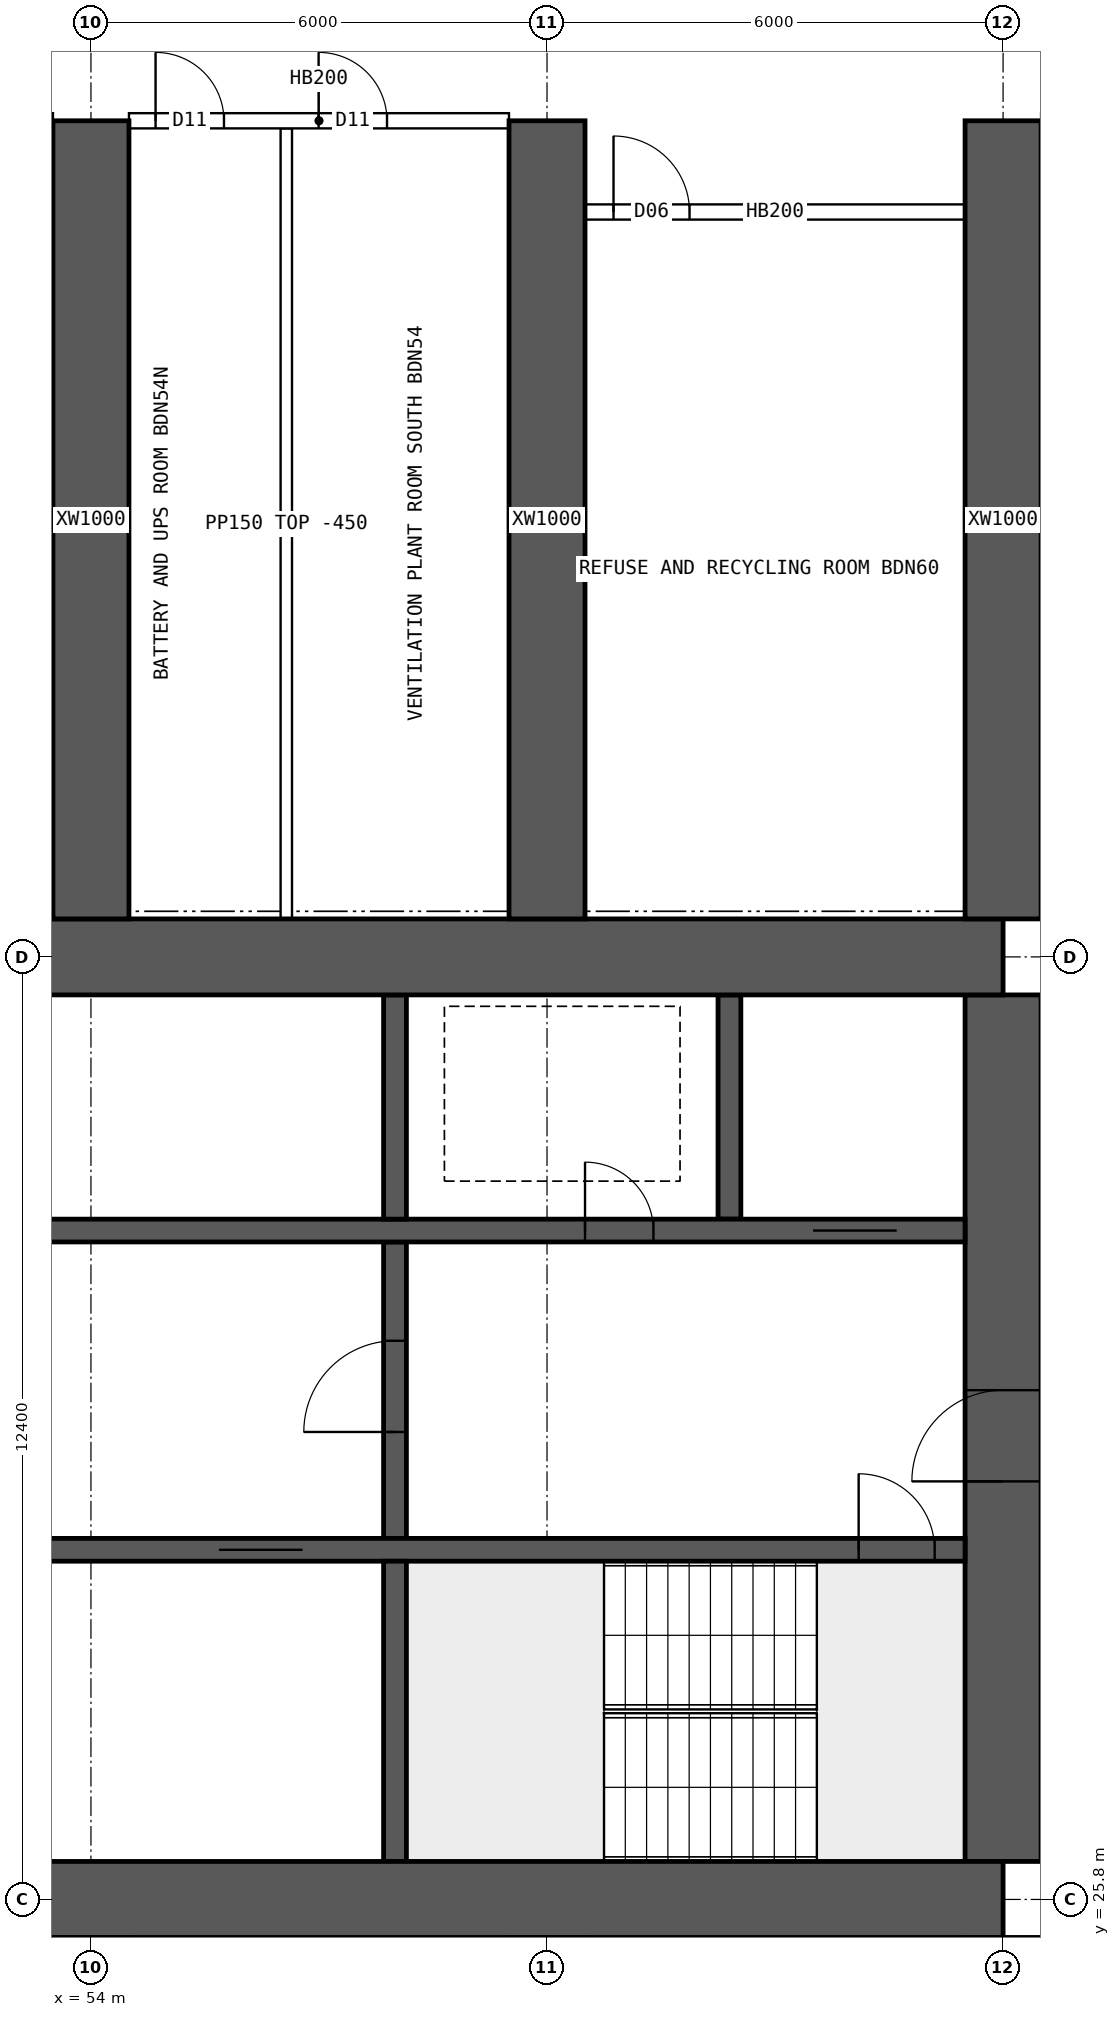
"""IFC4 building model, lengths in metres.
Left out: names, types, materials, properties, quantities, classifications, styles, units other than length and angle.
Written with IfcOpenShell. Run it as: python <this file> out.ifc"""

import sys

from ifc_helpers import new_model, si_unit, direction, frame, frame_2d, origin, place, context, subcontext, project, spatial, rectangle, extrude, element, fill, save


model = new_model("IFC4")
c1 = context("Model", 3, precision=1e-05, world=origin(), true_north=direction((0.0, 1.0)))
c2 = subcontext(c1, "Body", "Model", "MODEL_VIEW")
j1 = project(units=[si_unit("LENGTHUNIT", "METRE"), si_unit("PLANEANGLEUNIT", "RADIAN")], contexts=[c1])
p1 = place(None, origin())
s1 = spatial("IfcSite", under=j1, at=p1, CompositionType="ELEMENT")
p2 = place(p1, origin())
s2 = spatial("IfcBuilding", under=s1, at=p2, CompositionType="ELEMENT")
p3 = place(p2, frame((0.0, 0.0, 35.2)))
s3 = spatial("IfcBuildingStorey", under=s2, at=p3, CompositionType="ELEMENT", Elevation=35.2)
for number, where, z_axis, x_axis in (
    (1, (18.0, 25.8, 0.0), (0.0, 0.0, 1.0), (1.0, 0.0, 0.0)),
    (2, (18.0, 38.2, 0.0), (0.0, 0.0, 1.0), (1.0, 0.0, 0.0)),
):
    element("IfcWall", number, at=place(p3, frame(where, z_axis=z_axis, x_axis=x_axis)), inside=s3, PredefinedType="SHEAR", context=c2, shape_type="SweptSolid", body=[
        extrude(rectangle(XDim=48.0, YDim=1.0, at=frame_2d((24.0, 0.0))), origin(), (0.0, 0.0, 1.0), 3.75),
    ])
p4 = place(p3, frame((66.0, 26.3, 0.0), z_axis=(0.0, 0.0, 1.0), x_axis=(0.0, 1.0, 0.0)))
e3 = element("IfcWall", 3, at=p4, inside=s3, PredefinedType="SHEAR", context=c2, shape_type="SweptSolid", body=[
    extrude(rectangle(XDim=11.4, YDim=1.0, at=frame_2d((5.7, 0.0))), origin(), (0.0, 0.0, 1.0), 3.75),
])
p5 = place(p4, frame((5.0, 0.0, 0.0)))
e4 = element("IfcOpeningElement", 4, at=p5, cuts=e3, PredefinedType="OPENING", context=c2, shape_type="SweptSolid", body=[
    extrude(rectangle(XDim=1.2, YDim=2.1, at=frame_2d((0.6, 1.05))), frame((0.0, 0.51, 0.0), z_axis=(0.0, -1.0, 0.0), x_axis=(1.0, 0.0, 0.0)), (0.0, 0.0, 1.0), 1.02),
])
p6 = place(p3, frame((18.5, 30.4, 0.0), z_axis=(0.0, 0.0, 1.0), x_axis=(1.0, 0.0, 0.0)))
e5 = element("IfcWall", 5, at=p6, inside=s3, PredefinedType="SHEAR", context=c2, shape_type="SweptSolid", body=[
    extrude(rectangle(XDim=47.0, YDim=0.3, at=frame_2d((23.5, 0.0))), origin(), (0.0, 0.0, 1.0), 3.75),
])
p7 = place(p6, frame((0.4, 0.0, 0.0)))
e6 = element("IfcOpeningElement", 6, at=p7, cuts=e5, PredefinedType="OPENING", context=c2, shape_type="SweptSolid", body=[
    extrude(rectangle(XDim=1.0, YDim=2.1, at=frame_2d((0.5, 1.05))), frame((0.0, 0.16, 0.0), z_axis=(0.0, -1.0, 0.0), x_axis=(1.0, 0.0, 0.0)), (0.0, 0.0, 1.0), 0.32),
])
p8 = place(p6, frame((45.6, 0.0, 0.0)))
e7 = element("IfcOpeningElement", 7, at=p8, cuts=e5, PredefinedType="OPENING", context=c2, shape_type="SweptSolid", body=[
    extrude(rectangle(XDim=1.0, YDim=2.1, at=frame_2d((0.5, 1.05))), frame((0.0, 0.16, 0.0), z_axis=(0.0, -1.0, 0.0), x_axis=(1.0, 0.0, 0.0)), (0.0, 0.0, 1.0), 0.32),
])
p9 = place(p6, frame((8.25, 0.0, 0.0)))
e8 = element("IfcOpeningElement", 8, at=p9, cuts=e5, PredefinedType="OPENING", context=c2, shape_type="SweptSolid", body=[
    extrude(rectangle(XDim=1.1, YDim=2.1, at=frame_2d((0.55, 1.05))), frame((0.0, 0.16, 0.0), z_axis=(0.0, -1.0, 0.0), x_axis=(1.0, 0.0, 0.0)), (0.0, 0.0, 1.0), 0.32),
])
p10 = place(p6, frame((10.85, 0.0, 0.0)))
e9 = element("IfcOpeningElement", 9, at=p10, cuts=e5, PredefinedType="OPENING", context=c2, shape_type="SweptSolid", body=[
    extrude(rectangle(XDim=1.1, YDim=2.1, at=frame_2d((0.55, 1.05))), frame((0.0, 0.16, 0.0), z_axis=(0.0, -1.0, 0.0), x_axis=(1.0, 0.0, 0.0)), (0.0, 0.0, 1.0), 0.32),
])
p11 = place(p6, frame((13.45, 0.0, 0.0)))
e10 = element("IfcOpeningElement", 10, at=p11, cuts=e5, PredefinedType="OPENING", context=c2, shape_type="SweptSolid", body=[
    extrude(rectangle(XDim=1.1, YDim=2.1, at=frame_2d((0.55, 1.05))), frame((0.0, 0.16, 0.0), z_axis=(0.0, -1.0, 0.0), x_axis=(1.0, 0.0, 0.0)), (0.0, 0.0, 1.0), 0.32),
])
p12 = place(p6, frame((16.05, 0.0, 0.0)))
e11 = element("IfcOpeningElement", 11, at=p12, cuts=e5, PredefinedType="OPENING", context=c2, shape_type="SweptSolid", body=[
    extrude(rectangle(XDim=1.1, YDim=2.1, at=frame_2d((0.55, 1.05))), frame((0.0, 0.16, 0.0), z_axis=(0.0, -1.0, 0.0), x_axis=(1.0, 0.0, 0.0)), (0.0, 0.0, 1.0), 0.32),
])
p13 = place(p6, frame((30.117, 0.0, 0.0)))
e12 = element("IfcOpeningElement", 12, at=p13, cuts=e5, PredefinedType="OPENING", context=c2, shape_type="SweptSolid", body=[
    extrude(rectangle(XDim=1.1, YDim=2.1, at=frame_2d((0.55, 1.05))), frame((0.0, 0.16, 0.0), z_axis=(0.0, -1.0, 0.0), x_axis=(1.0, 0.0, 0.0)), (0.0, 0.0, 1.0), 0.32),
])
p14 = place(p6, frame((33.65, 0.0, 0.0)))
e13 = element("IfcOpeningElement", 13, at=p14, cuts=e5, PredefinedType="OPENING", context=c2, shape_type="SweptSolid", body=[
    extrude(rectangle(XDim=1.1, YDim=2.1, at=frame_2d((0.55, 1.05))), frame((0.0, 0.16, 0.0), z_axis=(0.0, -1.0, 0.0), x_axis=(1.0, 0.0, 0.0)), (0.0, 0.0, 1.0), 0.32),
])
p15 = place(p6, frame((37.183, 0.0, 0.0)))
e14 = element("IfcOpeningElement", 14, at=p15, cuts=e5, PredefinedType="OPENING", context=c2, shape_type="SweptSolid", body=[
    extrude(rectangle(XDim=1.1, YDim=2.1, at=frame_2d((0.55, 1.05))), frame((0.0, 0.16, 0.0), z_axis=(0.0, -1.0, 0.0), x_axis=(1.0, 0.0, 0.0)), (0.0, 0.0, 1.0), 0.32),
])
p16 = place(p3, frame((18.5, 34.6, 0.0), z_axis=(0.0, 0.0, 1.0), x_axis=(1.0, 0.0, 0.0)))
e15 = element("IfcWall", 15, at=p16, inside=s3, PredefinedType="SHEAR", context=c2, shape_type="SweptSolid", body=[
    extrude(rectangle(XDim=47.0, YDim=0.3, at=frame_2d((23.5, 0.0))), origin(), (0.0, 0.0, 1.0), 3.75),
])
p17 = place(p16, frame((0.9, 0.0, 0.0)))
e16 = element("IfcOpeningElement", 16, at=p17, cuts=e15, PredefinedType="OPENING", context=c2, shape_type="SweptSolid", body=[
    extrude(rectangle(XDim=1.1, YDim=2.1, at=frame_2d((0.55, 1.05))), frame((0.0, 0.16, 0.0), z_axis=(0.0, -1.0, 0.0), x_axis=(1.0, 0.0, 0.0)), (0.0, 0.0, 1.0), 0.32),
])
p18 = place(p16, frame((45.0, 0.0, 0.0)))
e17 = element("IfcOpeningElement", 17, at=p18, cuts=e15, PredefinedType="OPENING", context=c2, shape_type="SweptSolid", body=[
    extrude(rectangle(XDim=1.1, YDim=2.1, at=frame_2d((0.55, 1.05))), frame((0.0, 0.16, 0.0), z_axis=(0.0, -1.0, 0.0), x_axis=(1.0, 0.0, 0.0)), (0.0, 0.0, 1.0), 0.32),
])
p19 = place(p16, frame((4.1, 0.0, 0.0)))
e18 = element("IfcOpeningElement", 18, at=p19, cuts=e15, PredefinedType="OPENING", context=c2, shape_type="SweptSolid", body=[
    extrude(rectangle(XDim=0.9, YDim=2.1, at=frame_2d((0.45, 1.05))), frame((0.0, 0.16, 0.0), z_axis=(0.0, -1.0, 0.0), x_axis=(1.0, 0.0, 0.0)), (0.0, 0.0, 1.0), 0.32),
])
p20 = place(p16, frame((42.0, 0.0, 0.0)))
e19 = element("IfcOpeningElement", 19, at=p20, cuts=e15, PredefinedType="OPENING", context=c2, shape_type="SweptSolid", body=[
    extrude(rectangle(XDim=0.9, YDim=2.1, at=frame_2d((0.45, 1.05))), frame((0.0, 0.16, 0.0), z_axis=(0.0, -1.0, 0.0), x_axis=(1.0, 0.0, 0.0)), (0.0, 0.0, 1.0), 0.32),
])
p21 = place(p16, frame((8.875, 0.0, 0.0)))
e20 = element("IfcOpeningElement", 20, at=p21, cuts=e15, PredefinedType="OPENING", context=c2, shape_type="SweptSolid", body=[
    extrude(rectangle(XDim=0.9, YDim=2.1, at=frame_2d((0.45, 1.05))), frame((0.0, 0.16, 0.0), z_axis=(0.0, -1.0, 0.0), x_axis=(1.0, 0.0, 0.0)), (0.0, 0.0, 1.0), 0.32),
])
p22 = place(p16, frame((12.849, 0.0, 0.0)))
e21 = element("IfcOpeningElement", 21, at=p22, cuts=e15, PredefinedType="OPENING", context=c2, shape_type="SweptSolid", body=[
    extrude(rectangle(XDim=0.9, YDim=2.1, at=frame_2d((0.45, 1.05))), frame((0.0, 0.16, 0.0), z_axis=(0.0, -1.0, 0.0), x_axis=(1.0, 0.0, 0.0)), (0.0, 0.0, 1.0), 0.32),
])
p23 = place(p16, frame((16.496, 0.0, 0.0)))
e22 = element("IfcOpeningElement", 22, at=p23, cuts=e15, PredefinedType="OPENING", context=c2, shape_type="SweptSolid", body=[
    extrude(rectangle(XDim=0.9, YDim=2.1, at=frame_2d((0.45, 1.05))), frame((0.0, 0.16, 0.0), z_axis=(0.0, -1.0, 0.0), x_axis=(1.0, 0.0, 0.0)), (0.0, 0.0, 1.0), 0.32),
])
p24 = place(p16, frame((20.255, 0.0, 0.0)))
e23 = element("IfcOpeningElement", 23, at=p24, cuts=e15, PredefinedType="OPENING", context=c2, shape_type="SweptSolid", body=[
    extrude(rectangle(XDim=0.9, YDim=2.1, at=frame_2d((0.45, 1.05))), frame((0.0, 0.16, 0.0), z_axis=(0.0, -1.0, 0.0), x_axis=(1.0, 0.0, 0.0)), (0.0, 0.0, 1.0), 0.32),
])
p25 = place(p16, frame((24.661, 0.0, 0.0)))
e24 = element("IfcOpeningElement", 24, at=p25, cuts=e15, PredefinedType="OPENING", context=c2, shape_type="SweptSolid", body=[
    extrude(rectangle(XDim=0.9, YDim=2.1, at=frame_2d((0.45, 1.05))), frame((0.0, 0.16, 0.0), z_axis=(0.0, -1.0, 0.0), x_axis=(1.0, 0.0, 0.0)), (0.0, 0.0, 1.0), 0.32),
])
p26 = place(p16, frame((27.458, 0.0, 0.0)))
e25 = element("IfcOpeningElement", 25, at=p26, cuts=e15, PredefinedType="OPENING", context=c2, shape_type="SweptSolid", body=[
    extrude(rectangle(XDim=0.9, YDim=2.1, at=frame_2d((0.45, 1.05))), frame((0.0, 0.16, 0.0), z_axis=(0.0, -1.0, 0.0), x_axis=(1.0, 0.0, 0.0)), (0.0, 0.0, 1.0), 0.32),
])
p27 = place(p16, frame((33.579, 0.0, 0.0)))
e26 = element("IfcOpeningElement", 26, at=p27, cuts=e15, PredefinedType="OPENING", context=c2, shape_type="SweptSolid", body=[
    extrude(rectangle(XDim=0.9, YDim=2.1, at=frame_2d((0.45, 1.05))), frame((0.0, 0.16, 0.0), z_axis=(0.0, -1.0, 0.0), x_axis=(1.0, 0.0, 0.0)), (0.0, 0.0, 1.0), 0.32),
])
p28 = place(p3, frame((58.0, 26.3, 0.0), z_axis=(0.0, 0.0, 1.0), x_axis=(0.0, 1.0, 0.0)))
e27 = element("IfcWall", 27, at=p28, inside=s3, PredefinedType="SHEAR", context=c2, shape_type="SweptSolid", body=[
    extrude(rectangle(XDim=3.95, YDim=0.3, at=frame_2d((1.975, 0.0))), origin(), (0.0, 0.0, 1.0), 3.75),
])
p29 = place(p3, frame((58.0, 30.55, 0.0), z_axis=(0.0, 0.0, 1.0), x_axis=(0.0, 1.0, 0.0)))
e28 = element("IfcWall", 28, at=p29, inside=s3, PredefinedType="SHEAR", context=c2, shape_type="SweptSolid", body=[
    extrude(rectangle(XDim=3.9, YDim=0.3, at=frame_2d((1.95, 0.0))), origin(), (0.0, 0.0, 1.0), 3.75),
])
p30 = place(p29, frame((1.4, 0.0, 0.0)))
e29 = element("IfcOpeningElement", 29, at=p30, cuts=e28, PredefinedType="OPENING", context=c2, shape_type="SweptSolid", body=[
    extrude(rectangle(XDim=1.2, YDim=2.1, at=frame_2d((0.6, 1.05))), frame((0.0, 0.16, 0.0), z_axis=(0.0, -1.0, 0.0), x_axis=(1.0, 0.0, 0.0)), (0.0, 0.0, 1.0), 0.32),
])
for number, where, z_axis, x_axis in (
    (30, (62.4, 34.75, 0.0), (0.0, 0.0, 1.0), (0.0, 1.0, 0.0)),
    (31, (58.0, 34.75, 0.0), (0.0, 0.0, 1.0), (0.0, 1.0, 0.0)),
):
    element("IfcWall", number, at=place(p3, frame(where, z_axis=z_axis, x_axis=x_axis)), inside=s3, PredefinedType="SHEAR", context=c2, shape_type="SweptSolid", body=[
        extrude(rectangle(XDim=2.95, YDim=0.3, at=frame_2d((1.475, 0.0))), origin(), (0.0, 0.0, 1.0), 3.75),
    ])
for number, where, z_axis, x_axis in (
    (32, (54.0, 38.7, 0.0), (0.0, 0.0, 1.0), (0.0, 1.0, 0.0)),
    (33, (60.0, 38.7, 0.0), (0.0, 0.0, 1.0), (0.0, 1.0, 0.0)),
    (34, (66.0, 38.7, 0.0), (0.0, 0.0, 1.0), (0.0, 1.0, 0.0)),
):
    element("IfcWall", number, at=place(p3, frame(where, z_axis=z_axis, x_axis=x_axis)), inside=s3, PredefinedType="SHEAR", context=c2, shape_type="SweptSolid", body=[
        extrude(rectangle(XDim=10.5, YDim=1.0, at=frame_2d((5.25, 0.0))), origin(), (0.0, 0.0, 1.0), 3.75),
    ])
p31 = place(p3, frame((54.5, 49.2, 0.0), z_axis=(0.0, 0.0, 1.0), x_axis=(1.0, 0.0, 0.0)))
e35 = element("IfcWall", 35, at=p31, inside=s3, PredefinedType="SOLIDWALL", context=c2, shape_type="SweptSolid", body=[
    extrude(rectangle(XDim=5.0, YDim=0.2, at=frame_2d((2.5, 0.0))), origin(), (0.0, 0.0, 1.0), 3.3),
])
p32 = place(p31, frame((0.35, 0.0, 0.0)))
e36 = element("IfcOpeningElement", 36, at=p32, cuts=e35, PredefinedType="OPENING", context=c2, shape_type="SweptSolid", body=[
    extrude(rectangle(XDim=0.9, YDim=2.1, at=frame_2d((0.45, 1.05))), frame((0.0, 0.11, 0.0), z_axis=(0.0, -1.0, 0.0), x_axis=(1.0, 0.0, 0.0)), (0.0, 0.0, 1.0), 0.22),
])
p33 = place(p31, frame((2.495, 0.0, 0.0)))
e37 = element("IfcOpeningElement", 37, at=p33, cuts=e35, PredefinedType="OPENING", context=c2, shape_type="SweptSolid", body=[
    extrude(rectangle(XDim=0.9, YDim=2.1, at=frame_2d((0.45, 1.05))), frame((0.0, 0.11, 0.0), z_axis=(0.0, -1.0, 0.0), x_axis=(1.0, 0.0, 0.0)), (0.0, 0.0, 1.0), 0.22),
])
for number, where, z_axis, x_axis in (
    (38, (57.925, 14.9, 0.0), (0.0, 0.0, 1.0), (0.0, 1.0, 0.0)),
    (39, (62.385, 14.9, 0.0), (0.0, 0.0, 1.0), (0.0, 1.0, 0.0)),
    (40, (56.57, 38.7, 0.0), (0.0, 0.0, 1.0), (0.0, 1.0, 0.0)),
):
    element("IfcWall", number, at=place(p3, frame(where, z_axis=z_axis, x_axis=x_axis)), inside=s3, PredefinedType="PARTITIONING", context=c2, shape_type="SweptSolid", body=[
        extrude(rectangle(XDim=10.4, YDim=0.15, at=frame_2d((5.2, 0.0))), origin(), (0.0, 0.0, 1.0), 3.3),
    ])
p34 = place(p3, frame((60.5, 48.0, 0.0), z_axis=(0.0, 0.0, 1.0), x_axis=(1.0, 0.0, 0.0)))
e41 = element("IfcWall", 41, at=p34, inside=s3, PredefinedType="SOLIDWALL", context=c2, shape_type="SweptSolid", body=[
    extrude(rectangle(XDim=5.0, YDim=0.2, at=frame_2d((2.5, 0.0))), origin(), (0.0, 0.0, 1.0), 3.3),
])
p35 = place(p34, frame((0.375, 0.0, 0.0)))
e42 = element("IfcOpeningElement", 42, at=p35, cuts=e41, PredefinedType="OPENING", context=c2, shape_type="SweptSolid", body=[
    extrude(rectangle(XDim=1.0, YDim=2.1, at=frame_2d((0.5, 1.05))), frame((0.0, 0.11, 0.0), z_axis=(0.0, -1.0, 0.0), x_axis=(1.0, 0.0, 0.0)), (0.0, 0.0, 1.0), 0.22),
])
p36 = place(p5, origin())
e43 = element("IfcDoor", 43, at=p36, inside=s3, OperationType="SINGLE_SWING_LEFT", PredefinedType="DOOR", context=c2, shape_type="SweptSolid", body=[
    extrude(rectangle(XDim=1.2, YDim=2.1, at=frame_2d((0.6, 1.05))), frame((0.0, 0.025, 0.0), z_axis=(0.0, -1.0, 0.0), x_axis=(1.0, 0.0, 0.0)), (0.0, 0.0, 1.0), 0.05),
])
fill(e4, e43)
p37 = place(p8, origin())
e44 = element("IfcDoor", 44, at=p37, inside=s3, OperationType="SINGLE_SWING_LEFT", PredefinedType="DOOR", context=c2, shape_type="SweptSolid", body=[
    extrude(rectangle(XDim=1.0, YDim=2.1, at=frame_2d((0.5, 1.05))), frame((0.0, 0.025, 0.0), z_axis=(0.0, -1.0, 0.0), x_axis=(1.0, 0.0, 0.0)), (0.0, 0.0, 1.0), 0.05),
])
fill(e7, e44)
p38 = place(p18, origin())
e45 = element("IfcDoor", 45, at=p38, inside=s3, OperationType="DOUBLE_DOOR_SLIDING", PredefinedType="DOOR", context=c2, shape_type="SweptSolid", body=[
    extrude(rectangle(XDim=1.1, YDim=2.1, at=frame_2d((0.55, 1.05))), frame((0.0, 0.025, 0.0), z_axis=(0.0, -1.0, 0.0), x_axis=(1.0, 0.0, 0.0)), (0.0, 0.0, 1.0), 0.05),
])
fill(e17, e45)
p39 = place(p20, origin())
e46 = element("IfcDoor", 46, at=p39, inside=s3, OperationType="SINGLE_SWING_LEFT", PredefinedType="DOOR", context=c2, shape_type="SweptSolid", body=[
    extrude(rectangle(XDim=0.9, YDim=2.1, at=frame_2d((0.45, 1.05))), frame((0.0, 0.025, 0.0), z_axis=(0.0, -1.0, 0.0), x_axis=(1.0, 0.0, 0.0)), (0.0, 0.0, 1.0), 0.05),
])
fill(e19, e46)
p40 = place(p30, origin())
e47 = element("IfcDoor", 47, at=p40, inside=s3, OperationType="SINGLE_SWING_LEFT", PredefinedType="DOOR", context=c2, shape_type="SweptSolid", body=[
    extrude(rectangle(XDim=1.2, YDim=2.1, at=frame_2d((0.6, 1.05))), frame((0.0, 0.025, 0.0), z_axis=(0.0, -1.0, 0.0), x_axis=(1.0, 0.0, 0.0)), (0.0, 0.0, 1.0), 0.05),
])
fill(e29, e47)
p41 = place(p15, origin())
e48 = element("IfcDoor", 48, at=p41, inside=s3, OperationType="DOUBLE_DOOR_SLIDING", PredefinedType="DOOR", context=c2, shape_type="SweptSolid", body=[
    extrude(rectangle(XDim=1.1, YDim=2.1, at=frame_2d((0.55, 1.05))), frame((0.0, 0.025, 0.0), z_axis=(0.0, -1.0, 0.0), x_axis=(1.0, 0.0, 0.0)), (0.0, 0.0, 1.0), 0.05),
])
fill(e14, e48)
p42 = place(p32, origin())
e49 = element("IfcDoor", 49, at=p42, inside=s3, OperationType="SINGLE_SWING_LEFT", PredefinedType="DOOR", context=c2, shape_type="SweptSolid", body=[
    extrude(rectangle(XDim=0.9, YDim=2.1, at=frame_2d((0.45, 1.05))), frame((0.0, 0.025, 0.0), z_axis=(0.0, -1.0, 0.0), x_axis=(1.0, 0.0, 0.0)), (0.0, 0.0, 1.0), 0.05),
])
fill(e36, e49)
p43 = place(p33, origin())
e50 = element("IfcDoor", 50, at=p43, inside=s3, OperationType="SINGLE_SWING_LEFT", PredefinedType="DOOR", context=c2, shape_type="SweptSolid", body=[
    extrude(rectangle(XDim=0.9, YDim=2.1, at=frame_2d((0.45, 1.05))), frame((0.0, 0.025, 0.0), z_axis=(0.0, -1.0, 0.0), x_axis=(1.0, 0.0, 0.0)), (0.0, 0.0, 1.0), 0.05),
])
fill(e37, e50)
p44 = place(p35, origin())
e51 = element("IfcDoor", 51, at=p44, inside=s3, OperationType="SINGLE_SWING_LEFT", PredefinedType="DOOR", context=c2, shape_type="SweptSolid", body=[
    extrude(rectangle(XDim=1.0, YDim=2.1, at=frame_2d((0.5, 1.05))), frame((0.0, 0.025, 0.0), z_axis=(0.0, -1.0, 0.0), x_axis=(1.0, 0.0, 0.0)), (0.0, 0.0, 1.0), 0.05),
])
fill(e42, e51)
save(model, sys.argv[1])
